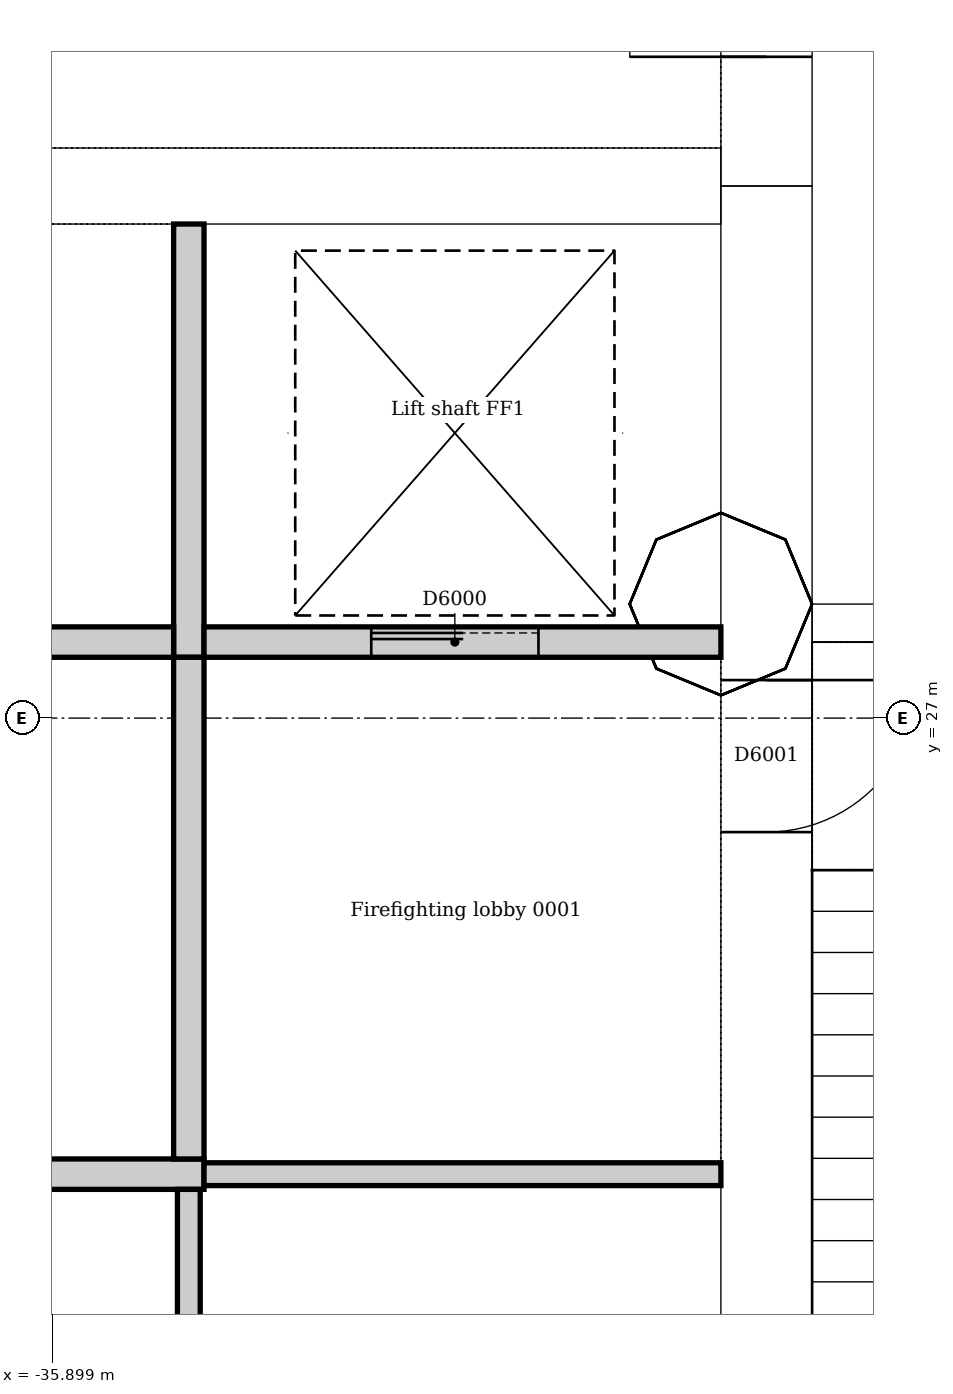
"""IFC4 building model, lengths in metres.
Left out: names, types, materials, properties, quantities, classifications, styles, units other than length and angle.
Written with IfcOpenShell. Run it as: python <this file> out.ifc"""

import sys

from ifc_helpers import new_model, si_unit, direction, frame, frame_2d, origin, place, context, subcontext, project, spatial, rectangle, extrude, element, fill, save


model = new_model("IFC4")
c1 = context("Model", 3, precision=1e-05, world=origin(), true_north=direction((0.0, 1.0)))
c2 = subcontext(c1, "Body", "Model", "MODEL_VIEW")
j1 = project(units=[si_unit("LENGTHUNIT", "METRE"), si_unit("PLANEANGLEUNIT", "RADIAN")], contexts=[c1])
p1 = place(None, origin())
s1 = spatial("IfcSite", under=j1, at=p1, CompositionType="ELEMENT")
p2 = place(p1, origin())
s2 = spatial("IfcBuilding", under=s1, at=p2, CompositionType="ELEMENT")
p3 = place(p2, frame((0.0, 0.0, -14.0)))
s3 = spatial("IfcBuildingStorey", under=s2, at=p3, CompositionType="ELEMENT", Elevation=-14.0)
p4 = place(p3, frame((-31.2, 21.0, 0.0), z_axis=(0.0, 0.0, 1.0), x_axis=(0.0, 1.0, 0.0)))
e1 = element("IfcWall", 1, at=p4, inside=s3, PredefinedType="SOLIDWALL", context=c2, shape_type="SweptSolid", body=[
    extrude(rectangle(XDim=9.5, YDim=0.6, at=frame_2d((4.75, 0.0))), origin(), (0.0, 0.0, 1.0), 4.5),
])
p5 = place(p4, frame((5.25, 0.0, 0.0)))
e2 = element("IfcOpeningElement", 2, at=p5, cuts=e1, PredefinedType="OPENING", context=c2, shape_type="SweptSolid", body=[
    extrude(rectangle(XDim=1.0, YDim=2.1, at=frame_2d((0.5, 1.05))), frame((0.0, 0.31, 0.0), z_axis=(0.0, -1.0, 0.0), x_axis=(1.0, 0.0, 0.0)), (0.0, 0.0, 1.0), 0.62),
])
p6 = place(p3, frame((-31.2, 30.5, 0.0), z_axis=(0.0, 0.0, 1.0), x_axis=(0.0, 1.0, 0.0)))
e3 = element("IfcWall", 3, at=p6, inside=s3, PredefinedType="SOLIDWALL", context=c2, shape_type="SweptSolid", body=[
    extrude(rectangle(XDim=11.5, YDim=0.6, at=frame_2d((5.75, 0.0))), origin(), (0.0, 0.0, 1.0), 4.5),
])
p7 = place(p6, frame((0.85, 0.0, 0.0)))
e4 = element("IfcOpeningElement", 4, at=p7, cuts=e3, PredefinedType="OPENING", context=c2, shape_type="SweptSolid", body=[
    extrude(rectangle(XDim=1.8, YDim=2.1, at=frame_2d((0.9, 1.05))), frame((0.0, 0.31, 0.0), z_axis=(0.0, -1.0, 0.0), x_axis=(1.0, 0.0, 0.0)), (0.0, 0.0, 1.0), 0.62),
])
p8 = place(p3, frame((-42.0, 30.5, 0.0), z_axis=(0.0, 0.0, 1.0), x_axis=(1.0, 0.0, 0.0)))
e5 = element("IfcWall", 5, at=p8, inside=s3, PredefinedType="SOLIDWALL", context=c2, shape_type="SweptSolid", body=[
    extrude(rectangle(XDim=10.5, YDim=0.5, at=frame_2d((5.25, 0.0))), origin(), (0.0, 0.0, 1.0), 4.5),
])
p9 = place(p3, frame((-27.36, 27.625, 0.0), z_axis=(0.0, 0.0, 1.0), x_axis=(-1.0, 0.0, 0.0)))
e6 = element("IfcWall", 6, at=p9, inside=s3, PredefinedType="SOLIDWALL", context=c2, shape_type="SweptSolid", body=[
    extrude(rectangle(XDim=3.54, YDim=0.25, at=frame_2d((1.77, 0.0))), origin(), (0.0, 0.0, 1.0), 4.5),
])
p10 = place(p9, frame((1.69, 0.0, 0.0)))
e7 = element("IfcOpeningElement", 7, at=p10, cuts=e6, PredefinedType="OPENING", context=c2, shape_type="SweptSolid", body=[
    extrude(rectangle(XDim=1.1, YDim=2.1, at=frame_2d((0.55, 1.05))), frame((0.0, 0.135, 0.0), z_axis=(0.0, -1.0, 0.0), x_axis=(1.0, 0.0, 0.0)), (0.0, 0.0, 1.0), 0.27),
])
p11 = place(p3, frame((-34.9, 24.0, 0.0), z_axis=(0.0, 0.0, 1.0), x_axis=(-1.0, 0.0, 0.0)))
e8 = element("IfcWall", 8, at=p11, inside=s3, PredefinedType="SOLIDWALL", context=c2, shape_type="SweptSolid", body=[
    extrude(rectangle(XDim=3.5, YDim=0.2, at=frame_2d((1.75, 0.0))), origin(), (0.0, 0.0, 1.0), 4.5),
])
p12 = place(p3, frame((-35.0, 27.4, 0.0), z_axis=(0.0, 0.0, 1.0), x_axis=(0.0, 1.0, 0.0)))
e9 = element("IfcWall", 9, at=p12, inside=s3, PredefinedType="SOLIDWALL", context=c2, shape_type="SweptSolid", body=[
    extrude(rectangle(XDim=2.85, YDim=0.2, at=frame_2d((1.425, 0.0))), origin(), (0.0, 0.0, 1.0), 4.5),
])
p13 = place(p3, frame((-38.4, 27.5, 0.0), z_axis=(0.0, 0.0, 1.0), x_axis=(1.0, 0.0, 0.0)))
e10 = element("IfcWall", 10, at=p13, inside=s3, PredefinedType="SOLIDWALL", context=c2, shape_type="SweptSolid", body=[
    extrude(rectangle(XDim=3.3, YDim=0.2, at=frame_2d((1.65, 0.0))), origin(), (0.0, 0.0, 1.0), 4.5),
])
p14 = place(p3, frame((-34.9, 27.5, 0.0), z_axis=(0.0, 0.0, 1.0), x_axis=(1.0, 0.0, 0.0)))
e11 = element("IfcWall", 11, at=p14, inside=s3, PredefinedType="SOLIDWALL", context=c2, shape_type="SweptSolid", body=[
    extrude(rectangle(XDim=3.4, YDim=0.2, at=frame_2d((1.7, 0.0))), origin(), (0.0, 0.0, 1.0), 4.5),
])
p15 = place(p14, frame((1.1, 0.0, 0.0)))
e12 = element("IfcOpeningElement", 12, at=p15, cuts=e11, PredefinedType="OPENING", context=c2, shape_type="SweptSolid", body=[
    extrude(rectangle(XDim=1.1, YDim=2.1, at=frame_2d((0.55, 1.05))), frame((0.0, 0.11, 0.0), z_axis=(0.0, -1.0, 0.0), x_axis=(1.0, 0.0, 0.0)), (0.0, 0.0, 1.0), 0.22),
])
p16 = place(p3, frame((-35.0, 24.1, 0.0), z_axis=(0.0, 0.0, 1.0), x_axis=(0.0, 1.0, 0.0)))
e13 = element("IfcWall", 13, at=p16, inside=s3, PredefinedType="SOLIDWALL", context=c2, shape_type="SweptSolid", body=[
    extrude(rectangle(XDim=3.3, YDim=0.2, at=frame_2d((1.65, 0.0))), origin(), (0.0, 0.0, 1.0), 4.5),
])
p17 = place(p3, frame((-35.0, 21.0, 0.0), z_axis=(0.0, 0.0, 1.0), x_axis=(0.0, 1.0, 0.0)))
e14 = element("IfcWall", 14, at=p17, inside=s3, PredefinedType="SOLIDWALL", context=c2, shape_type="SweptSolid", body=[
    extrude(rectangle(XDim=2.9, YDim=0.15, at=frame_2d((1.45, 0.0))), origin(), (0.0, 0.0, 1.0), 4.5),
])
p18 = place(p3, frame((-31.5, 24.0, 0.0), z_axis=(0.0, 0.0, 1.0), x_axis=(-1.0, 0.0, 0.0)))
e15 = element("IfcWall", 15, at=p18, inside=s3, PredefinedType="SOLIDWALL", context=c2, shape_type="SweptSolid", body=[
    extrude(rectangle(XDim=3.4, YDim=0.15, at=frame_2d((1.7, 0.0))), origin(), (0.0, 0.0, 1.0), 4.5),
])
p19 = place(p15, origin())
e16 = element("IfcDoor", 16, at=p19, inside=s3, OperationType="SLIDING_TO_LEFT", PredefinedType="DOOR", context=c2, shape_type="SweptSolid", body=[
    extrude(rectangle(XDim=1.1, YDim=2.1, at=frame_2d((0.55, 1.05))), frame((0.0, 0.025, 0.0), z_axis=(0.0, -1.0, 0.0), x_axis=(1.0, 0.0, 0.0)), (0.0, 0.0, 1.0), 0.05),
])
fill(e12, e16)
p20 = place(p5, frame((1.0, 0.0, 0.0), z_axis=(0.0, 0.0, 1.0), x_axis=(-1.0, 0.0, 0.0)))
e17 = element("IfcDoor", 17, at=p20, inside=s3, OperationType="SINGLE_SWING_LEFT", PredefinedType="DOOR", context=c2, shape_type="SweptSolid", body=[
    extrude(rectangle(XDim=1.0, YDim=2.1, at=frame_2d((0.5, 1.05))), frame((0.0, 0.025, 0.0), z_axis=(0.0, -1.0, 0.0), x_axis=(1.0, 0.0, 0.0)), (0.0, 0.0, 1.0), 0.05),
])
fill(e2, e17)
p21 = place(p7, origin())
e18 = element("IfcDoor", 18, at=p21, inside=s3, OperationType="DOUBLE_DOOR_SINGLE_SWING", PredefinedType="DOOR", context=c2, shape_type="SweptSolid", body=[
    extrude(rectangle(XDim=1.8, YDim=2.1, at=frame_2d((0.9, 1.05))), frame((0.0, 0.025, 0.0), z_axis=(0.0, -1.0, 0.0), x_axis=(1.0, 0.0, 0.0)), (0.0, 0.0, 1.0), 0.05),
])
fill(e4, e18)
save(model, sys.argv[1])
